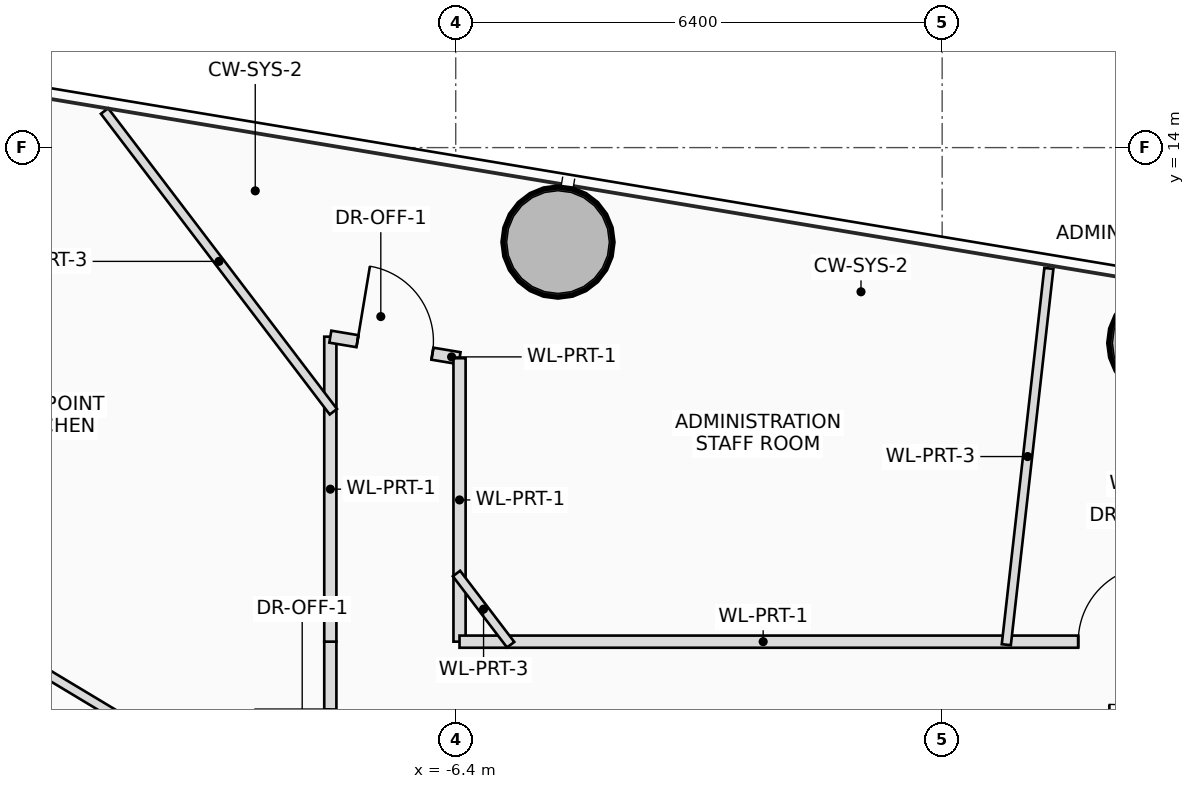
"""IFC4 building model, lengths in metres.
Left out: names, types, materials, properties, quantities, classifications, styles, units other than length and angle.
Written with IfcOpenShell. Run it as: python <this file> out.ifc"""

import sys

from ifc_helpers import new_model, si_unit, direction, frame, frame_2d, origin, origin_2d, place, context, subcontext, project, spatial, rectangle, hollow_circle, extrude, source, transform, mapped, element, fill, save


model = new_model("IFC4")
c1 = context("Model", 3, precision=1e-05, world=origin(), true_north=direction((0.0, 1.0)))
c2 = subcontext(c1, "Body", "Model", "MODEL_VIEW")
j1 = project(units=[si_unit("LENGTHUNIT", "METRE"), si_unit("PLANEANGLEUNIT", "RADIAN")], contexts=[c1])
p1 = place(None, origin())
s1 = spatial("IfcSite", under=j1, at=p1, CompositionType="ELEMENT")
p2 = place(p1, origin())
s2 = spatial("IfcBuilding", under=s1, at=p2, CompositionType="ELEMENT")
p3 = place(p2, frame((0.0, 0.0, 93.65)))
s3 = spatial("IfcBuildingStorey", under=s2, at=p3, CompositionType="ELEMENT", Elevation=93.65)
m1 = source(origin(), c2, "Body", "SweptSolid", [
    extrude(hollow_circle(Radius=0.725, WallThickness=0.05, at=origin_2d()), origin(), (0.0, 0.0, 1.0), 3.75),
])
for number, where, z_axis, x_axis in (
    (1, (2.915, 11.429, 0.0), (0.0, 0.0, 1.0), (1.0, 0.0, 0.0)),
    (2, (-5.054, 12.757, 0.0), (0.0, 0.0, 1.0), (1.0, 0.0, 0.0)),
):
    element("IfcColumn", number, at=place(p3, frame(where, z_axis=z_axis, x_axis=x_axis)), inside=s3, PredefinedType="COLUMN", context=c2, shape_type="MappedRepresentation", body=[
        mapped(m1, transform((0.0, 0.0, 0.0), scale=1.0)),
    ])
p4 = place(p3, frame((-8.05, -7.5, 0.0), z_axis=(0.0, 0.0, 1.0), x_axis=(0.0, 1.0, 0.0)))
e3 = element("IfcWall", 3, at=p4, inside=s3, PredefinedType="PARTITIONING", context=c2, shape_type="SweptSolid", body=[
    extrude(rectangle(XDim=15.0, YDim=0.16, at=frame_2d((7.5, 0.0))), origin(), (0.0, 0.0, 1.0), 2.85),
])
p5 = place(p4, frame((3.292, 0.0, 0.0)))
e4 = element("IfcOpeningElement", 4, at=p5, cuts=e3, PredefinedType="OPENING", context=c2, shape_type="SweptSolid", body=[
    extrude(rectangle(XDim=1.0, YDim=2.25, at=frame_2d((0.5, 1.125))), frame((0.0, 0.09, 0.0), z_axis=(0.0, -1.0, 0.0), x_axis=(1.0, 0.0, 0.0)), (0.0, 0.0, 1.0), 0.18),
])
p6 = place(p4, frame((8.524, 0.0, 0.0)))
e5 = element("IfcOpeningElement", 5, at=p6, cuts=e3, PredefinedType="OPENING", context=c2, shape_type="SweptSolid", body=[
    extrude(rectangle(XDim=1.0, YDim=2.25, at=frame_2d((0.5, 1.125))), frame((0.0, 0.09, 0.0), z_axis=(0.0, -1.0, 0.0), x_axis=(1.0, 0.0, 0.0)), (0.0, 0.0, 1.0), 0.18),
])
p7 = place(p4, frame((13.105, 0.0, 0.0)))
e6 = element("IfcOpeningElement", 6, at=p7, cuts=e3, PredefinedType="OPENING", context=c2, shape_type="SweptSolid", body=[
    extrude(rectangle(XDim=1.0, YDim=2.25, at=frame_2d((0.5, 1.125))), frame((0.0, 0.09, 0.0), z_axis=(0.0, -1.0, 0.0), x_axis=(1.0, 0.0, 0.0)), (0.0, 0.0, 1.0), 0.18),
])
p8 = place(p3, frame((-8.05, 7.5, 0.0), z_axis=(0.0, 0.0, 1.0), x_axis=(0.0, 1.0, 0.0)))
e7 = element("IfcWall", 7, at=p8, inside=s3, PredefinedType="PARTITIONING", context=c2, shape_type="SweptSolid", body=[
    extrude(rectangle(XDim=4.012, YDim=0.16, at=frame_2d((2.006, 0.0))), origin(), (0.0, 0.0, 1.0), 2.85),
])
p9 = place(p3, frame((-8.05, 11.512, 0.0), z_axis=(0.0, 0.0, 1.0), x_axis=(0.986405407683, -0.164330069354, 0.0)))
e8 = element("IfcWall", 8, at=p9, inside=s3, PredefinedType="PARTITIONING", context=c2, shape_type="SweptSolid", body=[
    extrude(rectangle(XDim=1.723, YDim=0.16, at=frame_2d((0.862, 0.0))), origin(), (0.0, 0.0, 1.0), 3.545),
])
p10 = place(p9, frame((0.362, 0.0, 0.0)))
e9 = element("IfcOpeningElement", 9, at=p10, cuts=e8, PredefinedType="OPENING", context=c2, shape_type="SweptSolid", body=[
    extrude(rectangle(XDim=1.0, YDim=2.25, at=frame_2d((0.5, 1.125))), frame((0.0, 0.09, 0.0), z_axis=(0.0, -1.0, 0.0), x_axis=(1.0, 0.0, 0.0)), (0.0, 0.0, 1.0), 0.18),
])
p11 = place(p3, frame((-6.35, 11.229, 0.0), z_axis=(0.0, 0.0, 1.0), x_axis=(0.0, -1.0, 0.0)))
e10 = element("IfcWall", 10, at=p11, inside=s3, PredefinedType="PARTITIONING", context=c2, shape_type="SweptSolid", body=[
    extrude(rectangle(XDim=3.729, YDim=0.16, at=frame_2d((1.865, 0.0))), origin(), (0.0, 0.0, 1.0), 3.05),
])
p12 = place(p3, frame((-6.35, 7.5, 0.0), z_axis=(0.0, 0.0, 1.0), x_axis=(1.0, 0.0, 0.0)))
e11 = element("IfcWall", 11, at=p12, inside=s3, PredefinedType="PARTITIONING", context=c2, shape_type="SweptSolid", body=[
    extrude(rectangle(XDim=12.7, YDim=0.16, at=frame_2d((6.35, 0.0))), origin(), (0.0, 0.0, 1.0), 2.85),
])
p13 = place(p12, frame((8.14, 0.0, 0.0)))
e12 = element("IfcOpeningElement", 12, at=p13, cuts=e11, PredefinedType="OPENING", context=c2, shape_type="SweptSolid", body=[
    extrude(rectangle(XDim=1.0, YDim=2.25, at=frame_2d((0.5, 1.125))), frame((0.0, 0.09, 0.0), z_axis=(0.0, -1.0, 0.0), x_axis=(1.0, 0.0, 0.0)), (0.0, 0.0, 1.0), 0.18),
])
p14 = place(p12, frame((10.799, 0.0, 0.0)))
e13 = element("IfcOpeningElement", 13, at=p14, cuts=e11, PredefinedType="OPENING", context=c2, shape_type="SweptSolid", body=[
    extrude(rectangle(XDim=1.0, YDim=2.25, at=frame_2d((0.5, 1.125))), frame((0.0, 0.09, 0.0), z_axis=(0.0, -1.0, 0.0), x_axis=(1.0, 0.0, 0.0)), (0.0, 0.0, 1.0), 0.18),
])
p15 = place(p3, frame((-8.01, 4.813, 0.0), z_axis=(0.0, 0.0, 1.0), x_axis=(-0.857173493242, 0.515027768653, 0.0)))
e14 = element("IfcWall", 14, at=p15, inside=s3, PredefinedType="PARTITIONING", context=c2, shape_type="SweptSolid", body=[
    extrude(rectangle(XDim=11.605, YDim=0.12, at=frame_2d((5.803, 0.0))), origin(), (0.0, 0.0, 1.0), 2.85),
])
p16 = place(p3, frame((0.844, 7.46, 0.0), z_axis=(0.0, 0.0, 1.0), x_axis=(0.112405035284, 0.99366247189, 0.0)))
e15 = element("IfcWall", 15, at=p16, inside=s3, PredefinedType="PARTITIONING", context=c2, shape_type="SweptSolid", body=[
    extrude(rectangle(XDim=4.982, YDim=0.12, at=frame_2d((2.491, 0.0))), origin(), (0.0, 0.0, 1.0), 3.01),
])
p17 = place(p3, frame((-5.677, 7.46, 0.0), z_axis=(0.0, 0.0, 1.0), x_axis=(-0.605430415, 0.795898242612, 0.0)))
e16 = element("IfcWall", 16, at=p17, inside=s3, PredefinedType="PARTITIONING", context=c2, shape_type="SweptSolid", body=[
    extrude(rectangle(XDim=1.177, YDim=0.12, at=frame_2d((0.588, 0.0))), origin(), (0.0, 0.0, 1.0), 2.85),
])
p18 = place(p3, frame((-8.01, 10.525, 0.0), z_axis=(0.0, 0.0, 1.0), x_axis=(-0.605587414203, 0.79577879072, 0.0)))
e17 = element("IfcWall", 17, at=p18, inside=s3, PredefinedType="PARTITIONING", context=c2, shape_type="SweptSolid", body=[
    extrude(rectangle(XDim=4.972, YDim=0.12, at=frame_2d((2.486, 0.0))), origin(), (0.0, 0.0, 1.0), 3.01),
])
p19 = place(p10, origin())
e18 = element("IfcDoor", 18, at=p19, inside=s3, OperationType="SINGLE_SWING_LEFT", PredefinedType="DOOR", context=c2, shape_type="SweptSolid", body=[
    extrude(rectangle(XDim=1.0, YDim=2.25, at=frame_2d((0.5, 1.125))), frame((0.0, 0.025, 0.0), z_axis=(0.0, -1.0, 0.0), x_axis=(1.0, 0.0, 0.0)), (0.0, 0.0, 1.0), 0.05),
])
fill(e9, e18)
p20 = place(p13, origin())
e19 = element("IfcDoor", 19, at=p20, inside=s3, OperationType="SINGLE_SWING_RIGHT", PredefinedType="DOOR", context=c2, shape_type="SweptSolid", body=[
    extrude(rectangle(XDim=1.0, YDim=2.25, at=frame_2d((0.5, 1.125))), frame((0.0, 0.025, 0.0), z_axis=(0.0, -1.0, 0.0), x_axis=(1.0, 0.0, 0.0)), (0.0, 0.0, 1.0), 0.05),
])
fill(e12, e19)
save(model, sys.argv[1])
